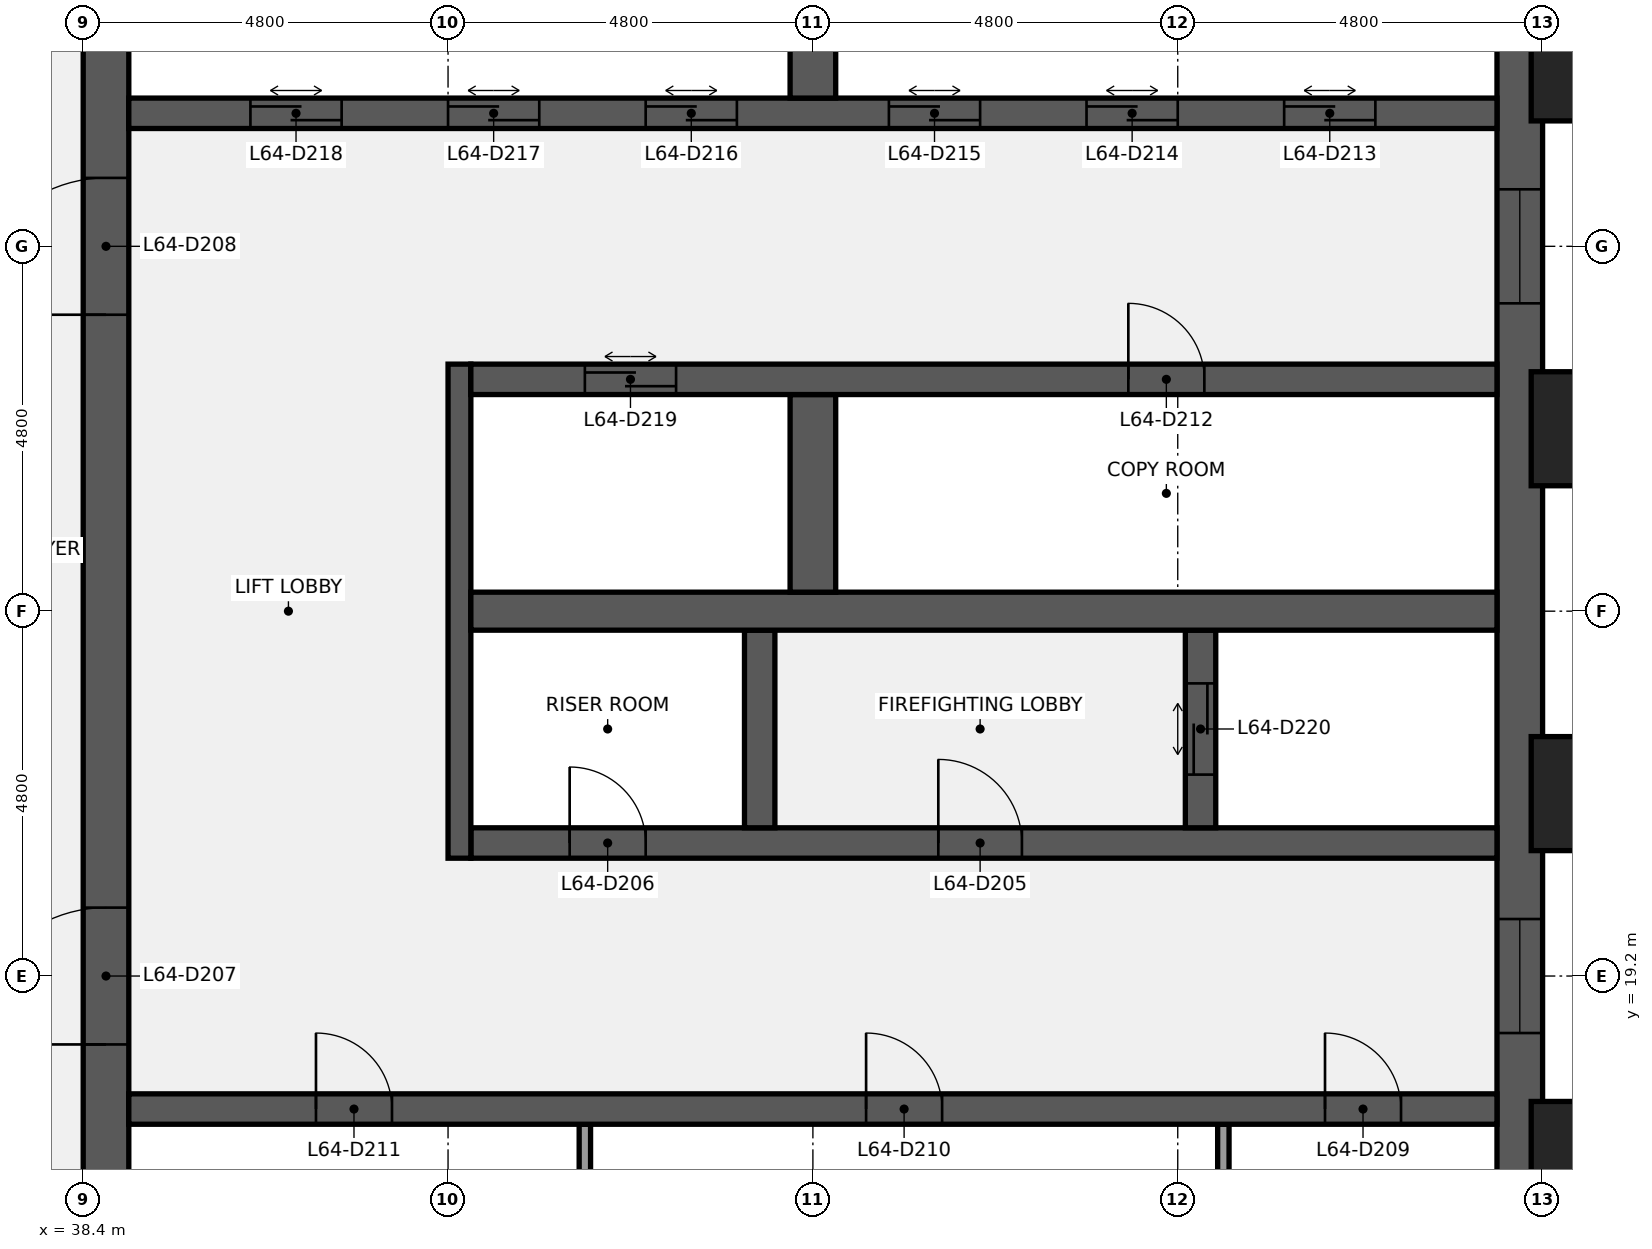
"""IFC4 building model, lengths in metres.
Left out: names, types, materials, properties, quantities, classifications, styles, units other than length and angle.
Written with IfcOpenShell. Run it as: python <this file> out.ifc"""

import sys

from ifc_helpers import new_model, si_unit, direction, frame, frame_2d, origin, origin_2d, place, context, subcontext, project, spatial, rectangle, extrude, element, fill, save


model = new_model("IFC4")
c1 = context("Model", 3, precision=1e-05, world=origin(), true_north=direction((0.0, 1.0)))
c2 = subcontext(c1, "Body", "Model", "MODEL_VIEW")
j1 = project(units=[si_unit("LENGTHUNIT", "METRE"), si_unit("PLANEANGLEUNIT", "RADIAN")], contexts=[c1])
p1 = place(None, origin())
s1 = spatial("IfcSite", under=j1, at=p1, CompositionType="ELEMENT")
p2 = place(p1, origin())
s2 = spatial("IfcBuilding", under=s1, at=p2, CompositionType="ELEMENT")
p3 = place(p2, frame((0.0, 0.0, 294.3)))
s3 = spatial("IfcBuildingStorey", under=s2, at=p3, CompositionType="ELEMENT", Elevation=294.3)
p4 = place(p3, frame((57.3, 38.4, 0.0), z_axis=(0.0, 0.0, 1.0), x_axis=(0.0, -1.0, 0.0)))
e1 = element("IfcWall", 1, at=p4, inside=s3, PredefinedType="SHEAR", context=c2, shape_type="SweptSolid", body=[
    extrude(rectangle(XDim=28.8, YDim=0.6, at=frame_2d((14.4, 0.0))), origin(), (0.0, 0.0, 1.0), 3.84),
])
p5 = place(p4, frame((18.45, 0.0, 0.9)))
e2 = element("IfcOpeningElement", 2, at=p5, cuts=e1, PredefinedType="OPENING", context=c2, shape_type="SweptSolid", body=[
    extrude(rectangle(XDim=1.5, YDim=1.5, at=frame_2d((0.75, 0.75))), frame((0.0, 0.31, 0.0), z_axis=(0.0, -1.0, 0.0), x_axis=(1.0, 0.0, 0.0)), (0.0, 0.0, 1.0), 0.62),
])
p6 = place(p4, frame((8.85, 0.0, 0.9)))
e3 = element("IfcOpeningElement", 3, at=p6, cuts=e1, PredefinedType="OPENING", context=c2, shape_type="SweptSolid", body=[
    extrude(rectangle(XDim=1.5, YDim=1.5, at=frame_2d((0.75, 0.75))), frame((0.0, 0.31, 0.0), z_axis=(0.0, -1.0, 0.0), x_axis=(1.0, 0.0, 0.0)), (0.0, 0.0, 1.0), 0.62),
])
p7 = place(p3, frame((38.7, 9.6, 0.0), z_axis=(0.0, 0.0, 1.0), x_axis=(0.0, 1.0, 0.0)))
e4 = element("IfcWall", 4, at=p7, inside=s3, PredefinedType="SHEAR", context=c2, shape_type="SweptSolid", body=[
    extrude(rectangle(XDim=28.8, YDim=0.6, at=frame_2d((14.4, 0.0))), origin(), (0.0, 0.0, 1.0), 3.84),
])
p8 = place(p7, frame((8.7, 0.0, 0.0)))
e5 = element("IfcOpeningElement", 5, at=p8, cuts=e4, PredefinedType="OPENING", context=c2, shape_type="SweptSolid", body=[
    extrude(rectangle(XDim=1.8, YDim=2.1, at=frame_2d((0.9, 1.05))), frame((0.0, 0.31, 0.0), z_axis=(0.0, -1.0, 0.0), x_axis=(1.0, 0.0, 0.0)), (0.0, 0.0, 1.0), 0.62),
])
p9 = place(p7, frame((18.3, 0.0, 0.0)))
e6 = element("IfcOpeningElement", 6, at=p9, cuts=e4, PredefinedType="OPENING", context=c2, shape_type="SweptSolid", body=[
    extrude(rectangle(XDim=1.8, YDim=2.1, at=frame_2d((0.9, 1.05))), frame((0.0, 0.31, 0.0), z_axis=(0.0, -1.0, 0.0), x_axis=(1.0, 0.0, 0.0)), (0.0, 0.0, 1.0), 0.62),
])
for number, where, z_axis, x_axis in (
    (7, (53.4, 14.65, 0.0), (0.0, 0.0, 1.0), (0.0, 1.0, 0.0)),
    (8, (45.0, 14.65, 0.0), (0.0, 0.0, 1.0), (0.0, 1.0, 0.0)),
):
    element("IfcWall", number, at=place(p3, frame(where, z_axis=z_axis, x_axis=x_axis)), inside=s3, PredefinedType="PARTITIONING", context=c2, shape_type="SweptSolid", body=[
        extrude(rectangle(XDim=2.6, YDim=0.15, at=frame_2d((1.3, 0.0))), origin(), (0.0, 0.0, 1.0), 3.84),
    ])
p10 = place(p3, frame((39.0, 17.45, 0.0), z_axis=(0.0, 0.0, 1.0), x_axis=(1.0, 0.0, 0.0)))
e9 = element("IfcWall", 9, at=p10, inside=s3, PredefinedType="SHEAR", context=c2, shape_type="SweptSolid", body=[
    extrude(rectangle(XDim=18.0, YDim=0.4, at=frame_2d((9.0, 0.0))), origin(), (0.0, 0.0, 1.0), 3.84),
])
p11 = place(p10, frame((15.738, 0.0, 0.0)))
e10 = element("IfcOpeningElement", 10, at=p11, cuts=e9, PredefinedType="OPENING", context=c2, shape_type="SweptSolid", body=[
    extrude(rectangle(XDim=1.0, YDim=2.1, at=frame_2d((0.5, 1.05))), frame((0.0, 0.21, 0.0), z_axis=(0.0, -1.0, 0.0), x_axis=(1.0, 0.0, 0.0)), (0.0, 0.0, 1.0), 0.42),
])
p12 = place(p10, frame((9.7, 0.0, 0.0)))
e11 = element("IfcOpeningElement", 11, at=p12, cuts=e9, PredefinedType="OPENING", context=c2, shape_type="SweptSolid", body=[
    extrude(rectangle(XDim=1.0, YDim=2.1, at=frame_2d((0.5, 1.05))), frame((0.0, 0.21, 0.0), z_axis=(0.0, -1.0, 0.0), x_axis=(1.0, 0.0, 0.0)), (0.0, 0.0, 1.0), 0.42),
])
p13 = place(p10, frame((2.462, 0.0, 0.0)))
e12 = element("IfcOpeningElement", 12, at=p13, cuts=e9, PredefinedType="OPENING", context=c2, shape_type="SweptSolid", body=[
    extrude(rectangle(XDim=1.0, YDim=2.1, at=frame_2d((0.5, 1.05))), frame((0.0, 0.21, 0.0), z_axis=(0.0, -1.0, 0.0), x_axis=(1.0, 0.0, 0.0)), (0.0, 0.0, 1.0), 0.42),
])
p14 = place(p3, frame((43.5, 20.95, 0.0), z_axis=(0.0, 0.0, 1.0), x_axis=(1.0, 0.0, 0.0)))
e13 = element("IfcWall", 13, at=p14, inside=s3, PredefinedType="SHEAR", context=c2, shape_type="SweptSolid", body=[
    extrude(rectangle(XDim=13.5, YDim=0.4, at=frame_2d((6.75, 0.0))), origin(), (0.0, 0.0, 1.0), 3.84),
])
p15 = place(p14, frame((6.15, 0.0, 0.0)))
e14 = element("IfcOpeningElement", 14, at=p15, cuts=e13, PredefinedType="OPENING", context=c2, shape_type="SweptSolid", body=[
    extrude(rectangle(XDim=1.1, YDim=2.1, at=frame_2d((0.55, 1.05))), frame((0.0, 0.21, 0.0), z_axis=(0.0, -1.0, 0.0), x_axis=(1.0, 0.0, 0.0)), (0.0, 0.0, 1.0), 0.42),
])
p16 = place(p14, frame((1.3, 0.0, 0.0)))
e15 = element("IfcOpeningElement", 15, at=p16, cuts=e13, PredefinedType="OPENING", context=c2, shape_type="SweptSolid", body=[
    extrude(rectangle(XDim=1.0, YDim=2.1, at=frame_2d((0.5, 1.05))), frame((0.0, 0.21, 0.0), z_axis=(0.0, -1.0, 0.0), x_axis=(1.0, 0.0, 0.0)), (0.0, 0.0, 1.0), 0.42),
])
p17 = place(p3, frame((43.35, 20.75, 0.0), z_axis=(0.0, 0.0, 1.0), x_axis=(0.0, 1.0, 0.0)))
e16 = element("IfcWall", 16, at=p17, inside=s3, PredefinedType="SHEAR", context=c2, shape_type="SweptSolid", body=[
    extrude(rectangle(XDim=6.5, YDim=0.3, at=frame_2d((3.25, 0.0))), origin(), (0.0, 0.0, 1.0), 3.84),
])
p18 = place(p3, frame((53.1, 21.15, 0.0), z_axis=(0.0, 0.0, 1.0), x_axis=(0.0, 1.0, 0.0)))
e17 = element("IfcWall", 17, at=p18, inside=s3, PredefinedType="SHEAR", context=c2, shape_type="SweptSolid", body=[
    extrude(rectangle(XDim=2.6, YDim=0.4, at=frame_2d((1.3, 0.0))), origin(), (0.0, 0.0, 1.0), 3.84),
])
p19 = place(p18, frame((0.7, 0.0, 0.0)))
e18 = element("IfcOpeningElement", 18, at=p19, cuts=e17, PredefinedType="OPENING", context=c2, shape_type="SweptSolid", body=[
    extrude(rectangle(XDim=1.2, YDim=2.1, at=frame_2d((0.6, 1.05))), frame((0.0, 0.21, 0.0), z_axis=(0.0, -1.0, 0.0), x_axis=(1.0, 0.0, 0.0)), (0.0, 0.0, 1.0), 0.42),
])
p20 = place(p3, frame((47.3, 21.15, 0.0), z_axis=(0.0, 0.0, 1.0), x_axis=(0.0, 1.0, 0.0)))
e19 = element("IfcWall", 19, at=p20, inside=s3, PredefinedType="SHEAR", context=c2, shape_type="SweptSolid", body=[
    extrude(rectangle(XDim=2.6, YDim=0.4, at=frame_2d((1.3, 0.0))), origin(), (0.0, 0.0, 1.0), 3.84),
])
p21 = place(p3, frame((43.5, 24.0, 0.0), z_axis=(0.0, 0.0, 1.0), x_axis=(1.0, 0.0, 0.0)))
e20 = element("IfcWall", 20, at=p21, inside=s3, PredefinedType="SHEAR", context=c2, shape_type="SweptSolid", body=[
    extrude(rectangle(XDim=13.5, YDim=0.5, at=frame_2d((6.75, 0.0))), origin(), (0.0, 0.0, 1.0), 3.84),
])
p22 = place(p3, frame((48.0, 24.25, 0.0), z_axis=(0.0, 0.0, 1.0), x_axis=(0.0, 1.0, 0.0)))
e21 = element("IfcWall", 21, at=p22, inside=s3, PredefinedType="SHEAR", context=c2, shape_type="SweptSolid", body=[
    extrude(rectangle(XDim=2.6, YDim=0.6, at=frame_2d((1.3, 0.0))), origin(), (0.0, 0.0, 1.0), 3.84),
])
p23 = place(p3, frame((43.5, 27.05, 0.0), z_axis=(0.0, 0.0, 1.0), x_axis=(1.0, 0.0, 0.0)))
e22 = element("IfcWall", 22, at=p23, inside=s3, PredefinedType="SHEAR", context=c2, shape_type="SweptSolid", body=[
    extrude(rectangle(XDim=13.5, YDim=0.4, at=frame_2d((6.75, 0.0))), origin(), (0.0, 0.0, 1.0), 3.84),
])
p24 = place(p23, frame((8.65, 0.0, 0.0)))
e23 = element("IfcOpeningElement", 23, at=p24, cuts=e22, PredefinedType="OPENING", context=c2, shape_type="SweptSolid", body=[
    extrude(rectangle(XDim=1.0, YDim=2.1, at=frame_2d((0.5, 1.05))), frame((0.0, 0.21, 0.0), z_axis=(0.0, -1.0, 0.0), x_axis=(1.0, 0.0, 0.0)), (0.0, 0.0, 1.0), 0.42),
])
p25 = place(p23, frame((1.5, 0.0, 0.0)))
e24 = element("IfcOpeningElement", 24, at=p25, cuts=e22, PredefinedType="OPENING", context=c2, shape_type="SweptSolid", body=[
    extrude(rectangle(XDim=1.2, YDim=2.1, at=frame_2d((0.6, 1.05))), frame((0.0, 0.21, 0.0), z_axis=(0.0, -1.0, 0.0), x_axis=(1.0, 0.0, 0.0)), (0.0, 0.0, 1.0), 0.42),
])
p26 = place(p3, frame((39.0, 30.55, 0.0), z_axis=(0.0, 0.0, 1.0), x_axis=(1.0, 0.0, 0.0)))
e25 = element("IfcWall", 25, at=p26, inside=s3, PredefinedType="SHEAR", context=c2, shape_type="SweptSolid", body=[
    extrude(rectangle(XDim=18.0, YDim=0.4, at=frame_2d((9.0, 0.0))), origin(), (0.0, 0.0, 1.0), 3.84),
])
p27 = place(p26, frame((15.2, 0.0, 0.0)))
e26 = element("IfcOpeningElement", 26, at=p27, cuts=e25, PredefinedType="OPENING", context=c2, shape_type="SweptSolid", body=[
    extrude(rectangle(XDim=1.2, YDim=2.1, at=frame_2d((0.6, 1.05))), frame((0.0, 0.21, 0.0), z_axis=(0.0, -1.0, 0.0), x_axis=(1.0, 0.0, 0.0)), (0.0, 0.0, 1.0), 0.42),
])
p28 = place(p26, frame((12.6, 0.0, 0.0)))
e27 = element("IfcOpeningElement", 27, at=p28, cuts=e25, PredefinedType="OPENING", context=c2, shape_type="SweptSolid", body=[
    extrude(rectangle(XDim=1.2, YDim=2.1, at=frame_2d((0.6, 1.05))), frame((0.0, 0.21, 0.0), z_axis=(0.0, -1.0, 0.0), x_axis=(1.0, 0.0, 0.0)), (0.0, 0.0, 1.0), 0.42),
])
p29 = place(p26, frame((10.0, 0.0, 0.0)))
e28 = element("IfcOpeningElement", 28, at=p29, cuts=e25, PredefinedType="OPENING", context=c2, shape_type="SweptSolid", body=[
    extrude(rectangle(XDim=1.2, YDim=2.1, at=frame_2d((0.6, 1.05))), frame((0.0, 0.21, 0.0), z_axis=(0.0, -1.0, 0.0), x_axis=(1.0, 0.0, 0.0)), (0.0, 0.0, 1.0), 0.42),
])
p30 = place(p26, frame((6.8, 0.0, 0.0)))
e29 = element("IfcOpeningElement", 29, at=p30, cuts=e25, PredefinedType="OPENING", context=c2, shape_type="SweptSolid", body=[
    extrude(rectangle(XDim=1.2, YDim=2.1, at=frame_2d((0.6, 1.05))), frame((0.0, 0.21, 0.0), z_axis=(0.0, -1.0, 0.0), x_axis=(1.0, 0.0, 0.0)), (0.0, 0.0, 1.0), 0.42),
])
p31 = place(p26, frame((4.2, 0.0, 0.0)))
e30 = element("IfcOpeningElement", 30, at=p31, cuts=e25, PredefinedType="OPENING", context=c2, shape_type="SweptSolid", body=[
    extrude(rectangle(XDim=1.2, YDim=2.1, at=frame_2d((0.6, 1.05))), frame((0.0, 0.21, 0.0), z_axis=(0.0, -1.0, 0.0), x_axis=(1.0, 0.0, 0.0)), (0.0, 0.0, 1.0), 0.42),
])
p32 = place(p26, frame((1.6, 0.0, 0.0)))
e31 = element("IfcOpeningElement", 31, at=p32, cuts=e25, PredefinedType="OPENING", context=c2, shape_type="SweptSolid", body=[
    extrude(rectangle(XDim=1.2, YDim=2.1, at=frame_2d((0.6, 1.05))), frame((0.0, 0.21, 0.0), z_axis=(0.0, -1.0, 0.0), x_axis=(1.0, 0.0, 0.0)), (0.0, 0.0, 1.0), 0.42),
])
p33 = place(p3, frame((48.0, 30.75, 0.0), z_axis=(0.0, 0.0, 1.0), x_axis=(0.0, 1.0, 0.0)))
e32 = element("IfcWall", 32, at=p33, inside=s3, PredefinedType="SHEAR", context=c2, shape_type="SweptSolid", body=[
    extrude(rectangle(XDim=2.6, YDim=0.6, at=frame_2d((1.3, 0.0))), origin(), (0.0, 0.0, 1.0), 3.84),
])
for number, where, z_axis, x_axis in (
    (33, (58.35, 16.8, 0.0), (0.0, 0.0, 1.0), (0.0, 1.0, 0.0)),
    (34, (58.35, 21.6, 0.0), (0.0, 0.0, 1.0), (0.0, 1.0, 0.0)),
    (35, (58.35, 26.4, 0.0), (0.0, 0.0, 1.0), (0.0, 1.0, 0.0)),
    (36, (58.35, 31.2, 0.0), (0.0, 0.0, 1.0), (0.0, 1.0, 0.0)),
):
    element("IfcColumn", number, at=place(p3, frame(where, z_axis=z_axis, x_axis=x_axis)), inside=s3, PredefinedType="PILASTER", context=c2, shape_type="SweptSolid", body=[
        extrude(rectangle(XDim=1.8, YDim=1.5, at=origin_2d()), origin(), (0.0, 0.0, 1.0), 4.0),
    ])
p34 = place(p15, origin())
e37 = element("IfcDoor", 37, at=p34, inside=s3, OperationType="SINGLE_SWING_LEFT", PredefinedType="DOOR", context=c2, shape_type="SweptSolid", body=[
    extrude(rectangle(XDim=1.1, YDim=2.1, at=frame_2d((0.55, 1.05))), frame((0.0, 0.025, 0.0), z_axis=(0.0, -1.0, 0.0), x_axis=(1.0, 0.0, 0.0)), (0.0, 0.0, 1.0), 0.05),
])
fill(e14, e37)
p35 = place(p16, origin())
e38 = element("IfcDoor", 38, at=p35, inside=s3, OperationType="SINGLE_SWING_LEFT", PredefinedType="DOOR", context=c2, shape_type="SweptSolid", body=[
    extrude(rectangle(XDim=1.0, YDim=2.1, at=frame_2d((0.5, 1.05))), frame((0.0, 0.025, 0.0), z_axis=(0.0, -1.0, 0.0), x_axis=(1.0, 0.0, 0.0)), (0.0, 0.0, 1.0), 0.05),
])
fill(e15, e38)
p36 = place(p8, origin())
e39 = element("IfcDoor", 39, at=p36, inside=s3, OperationType="DOUBLE_DOOR_SINGLE_SWING", PredefinedType="DOOR", context=c2, shape_type="SweptSolid", body=[
    extrude(rectangle(XDim=1.8, YDim=2.1, at=frame_2d((0.9, 1.05))), frame((0.0, 0.025, 0.0), z_axis=(0.0, -1.0, 0.0), x_axis=(1.0, 0.0, 0.0)), (0.0, 0.0, 1.0), 0.05),
])
fill(e5, e39)
p37 = place(p9, origin())
e40 = element("IfcDoor", 40, at=p37, inside=s3, OperationType="DOUBLE_DOOR_SINGLE_SWING", PredefinedType="DOOR", context=c2, shape_type="SweptSolid", body=[
    extrude(rectangle(XDim=1.8, YDim=2.1, at=frame_2d((0.9, 1.05))), frame((0.0, 0.025, 0.0), z_axis=(0.0, -1.0, 0.0), x_axis=(1.0, 0.0, 0.0)), (0.0, 0.0, 1.0), 0.05),
])
fill(e6, e40)
p38 = place(p11, origin())
e41 = element("IfcDoor", 41, at=p38, inside=s3, OperationType="SINGLE_SWING_LEFT", PredefinedType="DOOR", context=c2, shape_type="SweptSolid", body=[
    extrude(rectangle(XDim=1.0, YDim=2.1, at=frame_2d((0.5, 1.05))), frame((0.0, 0.025, 0.0), z_axis=(0.0, -1.0, 0.0), x_axis=(1.0, 0.0, 0.0)), (0.0, 0.0, 1.0), 0.05),
])
fill(e10, e41)
p39 = place(p12, origin())
e42 = element("IfcDoor", 42, at=p39, inside=s3, OperationType="SINGLE_SWING_LEFT", PredefinedType="DOOR", context=c2, shape_type="SweptSolid", body=[
    extrude(rectangle(XDim=1.0, YDim=2.1, at=frame_2d((0.5, 1.05))), frame((0.0, 0.025, 0.0), z_axis=(0.0, -1.0, 0.0), x_axis=(1.0, 0.0, 0.0)), (0.0, 0.0, 1.0), 0.05),
])
fill(e11, e42)
p40 = place(p13, origin())
e43 = element("IfcDoor", 43, at=p40, inside=s3, OperationType="SINGLE_SWING_LEFT", PredefinedType="DOOR", context=c2, shape_type="SweptSolid", body=[
    extrude(rectangle(XDim=1.0, YDim=2.1, at=frame_2d((0.5, 1.05))), frame((0.0, 0.025, 0.0), z_axis=(0.0, -1.0, 0.0), x_axis=(1.0, 0.0, 0.0)), (0.0, 0.0, 1.0), 0.05),
])
fill(e12, e43)
p41 = place(p24, origin())
e44 = element("IfcDoor", 44, at=p41, inside=s3, OperationType="SINGLE_SWING_LEFT", PredefinedType="DOOR", context=c2, shape_type="SweptSolid", body=[
    extrude(rectangle(XDim=1.0, YDim=2.1, at=frame_2d((0.5, 1.05))), frame((0.0, 0.025, 0.0), z_axis=(0.0, -1.0, 0.0), x_axis=(1.0, 0.0, 0.0)), (0.0, 0.0, 1.0), 0.05),
])
fill(e23, e44)
p42 = place(p27, origin())
e45 = element("IfcDoor", 45, at=p42, inside=s3, OperationType="DOUBLE_DOOR_SLIDING", PredefinedType="DOOR", context=c2, shape_type="SweptSolid", body=[
    extrude(rectangle(XDim=1.2, YDim=2.1, at=frame_2d((0.6, 1.05))), frame((0.0, 0.025, 0.0), z_axis=(0.0, -1.0, 0.0), x_axis=(1.0, 0.0, 0.0)), (0.0, 0.0, 1.0), 0.05),
])
fill(e26, e45)
p43 = place(p28, origin())
e46 = element("IfcDoor", 46, at=p43, inside=s3, OperationType="DOUBLE_DOOR_SLIDING", PredefinedType="DOOR", context=c2, shape_type="SweptSolid", body=[
    extrude(rectangle(XDim=1.2, YDim=2.1, at=frame_2d((0.6, 1.05))), frame((0.0, 0.025, 0.0), z_axis=(0.0, -1.0, 0.0), x_axis=(1.0, 0.0, 0.0)), (0.0, 0.0, 1.0), 0.05),
])
fill(e27, e46)
p44 = place(p29, origin())
e47 = element("IfcDoor", 47, at=p44, inside=s3, OperationType="DOUBLE_DOOR_SLIDING", PredefinedType="DOOR", context=c2, shape_type="SweptSolid", body=[
    extrude(rectangle(XDim=1.2, YDim=2.1, at=frame_2d((0.6, 1.05))), frame((0.0, 0.025, 0.0), z_axis=(0.0, -1.0, 0.0), x_axis=(1.0, 0.0, 0.0)), (0.0, 0.0, 1.0), 0.05),
])
fill(e28, e47)
p45 = place(p30, origin())
e48 = element("IfcDoor", 48, at=p45, inside=s3, OperationType="DOUBLE_DOOR_SLIDING", PredefinedType="DOOR", context=c2, shape_type="SweptSolid", body=[
    extrude(rectangle(XDim=1.2, YDim=2.1, at=frame_2d((0.6, 1.05))), frame((0.0, 0.025, 0.0), z_axis=(0.0, -1.0, 0.0), x_axis=(1.0, 0.0, 0.0)), (0.0, 0.0, 1.0), 0.05),
])
fill(e29, e48)
p46 = place(p31, origin())
e49 = element("IfcDoor", 49, at=p46, inside=s3, OperationType="DOUBLE_DOOR_SLIDING", PredefinedType="DOOR", context=c2, shape_type="SweptSolid", body=[
    extrude(rectangle(XDim=1.2, YDim=2.1, at=frame_2d((0.6, 1.05))), frame((0.0, 0.025, 0.0), z_axis=(0.0, -1.0, 0.0), x_axis=(1.0, 0.0, 0.0)), (0.0, 0.0, 1.0), 0.05),
])
fill(e30, e49)
p47 = place(p32, origin())
e50 = element("IfcDoor", 50, at=p47, inside=s3, OperationType="DOUBLE_DOOR_SLIDING", PredefinedType="DOOR", context=c2, shape_type="SweptSolid", body=[
    extrude(rectangle(XDim=1.2, YDim=2.1, at=frame_2d((0.6, 1.05))), frame((0.0, 0.025, 0.0), z_axis=(0.0, -1.0, 0.0), x_axis=(1.0, 0.0, 0.0)), (0.0, 0.0, 1.0), 0.05),
])
fill(e31, e50)
p48 = place(p25, origin())
e51 = element("IfcDoor", 51, at=p48, inside=s3, OperationType="DOUBLE_DOOR_SLIDING", PredefinedType="DOOR", context=c2, shape_type="SweptSolid", body=[
    extrude(rectangle(XDim=1.2, YDim=2.1, at=frame_2d((0.6, 1.05))), frame((0.0, 0.025, 0.0), z_axis=(0.0, -1.0, 0.0), x_axis=(1.0, 0.0, 0.0)), (0.0, 0.0, 1.0), 0.05),
])
fill(e24, e51)
p49 = place(p19, origin())
e52 = element("IfcDoor", 52, at=p49, inside=s3, OperationType="DOUBLE_DOOR_SLIDING", PredefinedType="DOOR", context=c2, shape_type="SweptSolid", body=[
    extrude(rectangle(XDim=1.2, YDim=2.1, at=frame_2d((0.6, 1.05))), frame((0.0, 0.025, 0.0), z_axis=(0.0, -1.0, 0.0), x_axis=(1.0, 0.0, 0.0)), (0.0, 0.0, 1.0), 0.05),
])
fill(e18, e52)
p50 = place(p5, origin())
e53 = element("IfcWindow", 53, at=p50, inside=s3, PartitioningType="SINGLE_PANEL", PredefinedType="WINDOW", context=c2, shape_type="SweptSolid", body=[
    extrude(rectangle(XDim=1.5, YDim=1.5, at=frame_2d((0.75, 0.75))), frame((0.0, 0.03, 0.0), z_axis=(0.0, -1.0, 0.0), x_axis=(1.0, 0.0, 0.0)), (0.0, 0.0, 1.0), 0.06),
])
fill(e2, e53)
p51 = place(p6, origin())
e54 = element("IfcWindow", 54, at=p51, inside=s3, PartitioningType="SINGLE_PANEL", PredefinedType="WINDOW", context=c2, shape_type="SweptSolid", body=[
    extrude(rectangle(XDim=1.5, YDim=1.5, at=frame_2d((0.75, 0.75))), frame((0.0, 0.03, 0.0), z_axis=(0.0, -1.0, 0.0), x_axis=(1.0, 0.0, 0.0)), (0.0, 0.0, 1.0), 0.06),
])
fill(e3, e54)
save(model, sys.argv[1])
